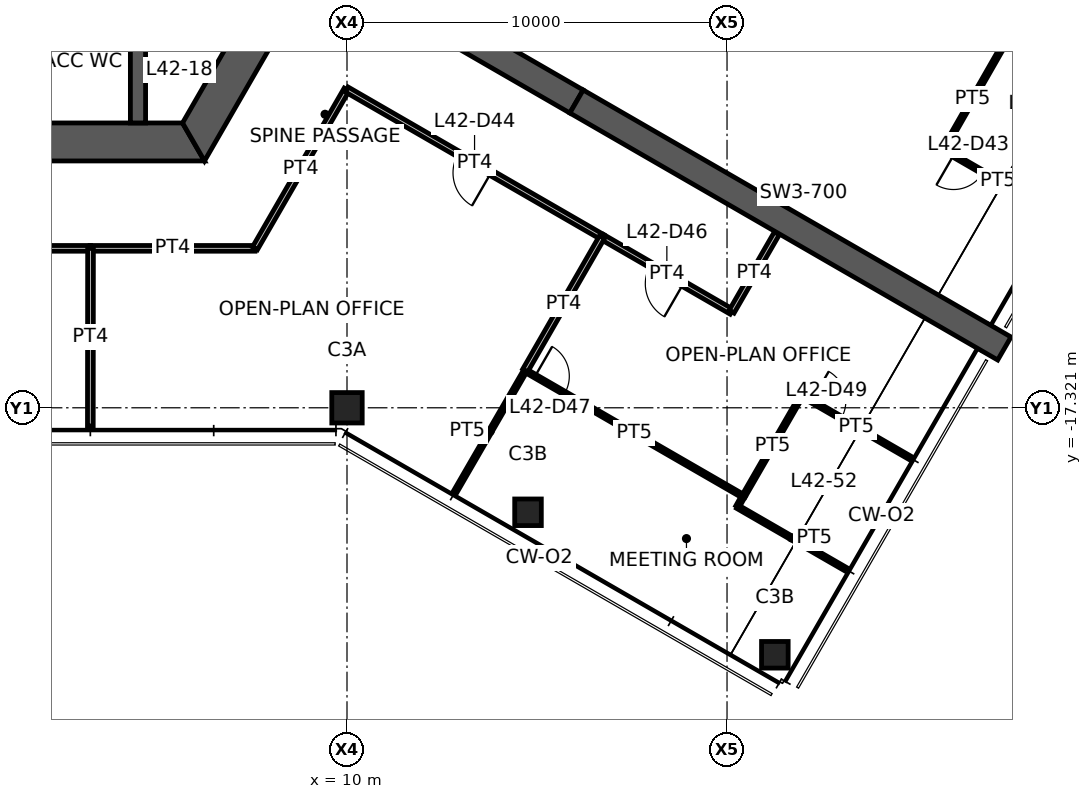
"""IFC4 building model, lengths in metres.
Left out: names, types, materials, properties, quantities, classifications, styles, units other than length and angle.
Written with IfcOpenShell. Run it as: python <this file> out.ifc"""

import sys

from ifc_helpers import new_model, si_unit, direction, frame, frame_2d, origin, origin_2d, place, context, subcontext, project, spatial, polyline, rectangle, hollow_rectangle, outline, extrude, element, fill, save


model = new_model("IFC4")
c1 = context("Model", 3, precision=1e-05, world=origin(), true_north=direction((0.0, 1.0)))
c2 = subcontext(c1, "Body", "Model", "MODEL_VIEW")
j1 = project(units=[si_unit("LENGTHUNIT", "METRE"), si_unit("PLANEANGLEUNIT", "RADIAN")], contexts=[c1])
p1 = place(None, origin())
s1 = spatial("IfcSite", under=j1, at=p1, CompositionType="ELEMENT")
p2 = place(p1, origin())
s2 = spatial("IfcBuilding", under=s1, at=p2, CompositionType="ELEMENT")
p3 = place(p2, frame((0.0, 0.0, 168.2)))
s3 = spatial("IfcBuildingStorey", under=s2, at=p3, CompositionType="ELEMENT", Elevation=168.2)
p4 = place(p3, frame((10.0, -17.321, 0.0), z_axis=(0.0, 0.0, 1.0), x_axis=(1.0, 0.0, 0.0)))
e1 = element("IfcColumn", 1, at=p4, inside=s3, PredefinedType="COLUMN", context=c2, shape_type="SweptSolid", body=[
    extrude(hollow_rectangle(XDim=0.8, YDim=0.8, WallThickness=0.045, at=origin_2d()), origin(), (0.0, 0.0, 1.0), 3.9),
])
for number, where, z_axis, x_axis in (
    (2, (14.763, -20.071, 0.0), (0.0, 0.0, 1.0), (1.0, 0.0, 0.0)),
    (3, (21.258, -23.821, 0.0), (0.0, 0.0, 1.0), (1.0, 0.0, 0.0)),
):
    element("IfcColumn", number, at=place(p3, frame(where, z_axis=z_axis, x_axis=x_axis)), inside=s3, PredefinedType="COLUMN", context=c2, shape_type="SweptSolid", body=[
        extrude(hollow_rectangle(XDim=0.7, YDim=0.7, WallThickness=0.036, at=origin_2d()), origin(), (0.0, 0.0, 1.0), 3.9),
    ])
p5 = place(p3, frame((-5.961, -10.325, 0.0), z_axis=(0.0, 0.0, 1.0), x_axis=(1.0, 0.0, 0.0)))
e4 = element("IfcWall", 4, at=p5, inside=s3, PredefinedType="SHEAR", context=c2, shape_type="SweptSolid", body=[
    extrude(outline(polyline([(-0.289, -0.5), (5.461, -0.5), (6.461, -0.5), (12.211, -0.5), (11.634, 0.5), (6.461, 0.5), (5.461, 0.5), (0.289, 0.5), (-0.289, -0.5)])), origin(), (0.0, 0.0, 1.0), 3.9),
])
p6 = place(p5, frame((5.461, 0.0, 0.0)))
e5 = element("IfcOpeningElement", 5, at=p6, cuts=e4, PredefinedType="OPENING", context=c2, shape_type="SweptSolid", body=[
    extrude(rectangle(XDim=1.0, YDim=2.1, at=frame_2d((0.5, 1.05))), frame((0.0, 0.51, 0.0), z_axis=(0.0, -1.0, 0.0), x_axis=(1.0, 0.0, 0.0)), (0.0, 0.0, 1.0), 1.02),
])
p7 = place(p3, frame((5.961, -10.325, 0.0), z_axis=(0.0, 0.0, 1.0), x_axis=(0.500004296715, 0.866022923061, 0.0)))
e6 = element("IfcWall", 6, at=p7, inside=s3, PredefinedType="SHEAR", context=c2, shape_type="SweptSolid", body=[
    extrude(outline(polyline([(-0.289, -0.5), (4.594, -0.5), (5.394, -0.5), (12.211, -0.5), (11.634, 0.5), (5.394, 0.5), (4.594, 0.5), (0.289, 0.5), (-0.289, -0.5)])), origin(), (0.0, 0.0, 1.0), 3.9),
])
p8 = place(p7, frame((4.594, 0.0, 0.0)))
e7 = element("IfcOpeningElement", 7, at=p8, cuts=e6, PredefinedType="OPENING", context=c2, shape_type="SweptSolid", body=[
    extrude(rectangle(XDim=0.8, YDim=2.1, at=frame_2d((0.4, 1.05))), frame((0.0, 0.51, 0.0), z_axis=(0.0, -1.0, 0.0), x_axis=(1.0, 0.0, 0.0)), (0.0, 0.0, 1.0), 1.02),
])
p9 = place(p3, frame((9.375, -5.413, 0.0), z_axis=(0.0, 0.0, 1.0), x_axis=(0.866032377459, -0.499987921047, 0.0)))
e8 = element("IfcWall", 8, at=p9, inside=s3, PredefinedType="SHEAR", context=c2, shape_type="SweptSolid", body=[
    extrude(rectangle(XDim=7.696, YDim=0.7, at=frame_2d((3.848, 0.0))), origin(), (0.0, 0.0, 1.0), 3.9),
])
p10 = place(p9, frame((0.9, 0.0, 0.0)))
e9 = element("IfcOpeningElement", 9, at=p10, cuts=e8, PredefinedType="OPENING", context=c2, shape_type="SweptSolid", body=[
    extrude(rectangle(XDim=1.0, YDim=2.1, at=frame_2d((0.5, 1.05))), frame((0.0, 0.36, 0.0), z_axis=(0.0, -1.0, 0.0), x_axis=(1.0, 0.0, 0.0)), (0.0, 0.0, 1.0), 0.72),
])
p11 = place(p3, frame((16.039, -9.26, 0.0), z_axis=(0.0, 0.0, 1.0), x_axis=(0.866024837091, -0.50000098154, 0.0)))
e10 = element("IfcWall", 10, at=p11, inside=s3, PredefinedType="SHEAR", context=c2, shape_type="SweptSolid", body=[
    extrude(rectangle(XDim=13.0, YDim=0.7, at=frame_2d((6.5, 0.0))), origin(), (0.0, 0.0, 1.0), 3.9),
])
p12 = place(p3, frame((4.5, -3.8, 0.0), z_axis=(0.0, 0.0, 1.0), x_axis=(0.0, -1.0, 0.0)))
e11 = element("IfcWall", 11, at=p12, inside=s3, PredefinedType="SHEAR", context=c2, shape_type="SweptSolid", body=[
    extrude(rectangle(XDim=6.025, YDim=0.4, at=frame_2d((3.012, 0.0))), origin(), (0.0, 0.0, 1.0), 3.9),
])
p13 = place(p3, frame((25.7, -10.527, 0.0), z_axis=(0.0, 0.0, 1.0), x_axis=(0.497097650811, 0.867694603855, 0.0)))
e12 = element("IfcWall", 12, at=p13, inside=s3, PredefinedType="PARTITIONING", context=c2, shape_type="SweptSolid", body=[
    extrude(rectangle(XDim=3.071, YDim=0.1, at=frame_2d((1.535, 0.0))), origin(), (0.0, 0.0, 1.0), 2.95),
])
p14 = place(p3, frame((28.562, -12.18, 0.0), z_axis=(0.0, 0.0, 1.0), x_axis=(-0.866020751647, 0.500008057651, 0.0)))
e13 = element("IfcWall", 13, at=p14, inside=s3, PredefinedType="PARTITIONING", context=c2, shape_type="SweptSolid", body=[
    extrude(rectangle(XDim=3.305, YDim=0.1, at=frame_2d((1.653, 0.0))), origin(), (0.0, 0.0, 1.0), 2.95),
])
p15 = place(p14, frame((2.105, 0.0, 0.0)))
e14 = element("IfcOpeningElement", 14, at=p15, cuts=e13, PredefinedType="OPENING", context=c2, shape_type="SweptSolid", body=[
    extrude(rectangle(XDim=0.9, YDim=2.1, at=frame_2d((0.45, 1.05))), frame((0.0, 0.06, 0.0), z_axis=(0.0, -1.0, 0.0), x_axis=(1.0, 0.0, 0.0)), (0.0, 0.0, 1.0), 0.12),
])
p16 = place(p3, frame((7.578, -13.125, 0.0), z_axis=(0.0, 0.0, 1.0), x_axis=(-1.0, 0.0, 0.0)))
e15 = element("IfcWall", 15, at=p16, inside=s3, PredefinedType="PARTITIONING", context=c2, shape_type="SweptSolid", body=[
    extrude(rectangle(XDim=4.336, YDim=0.15, at=frame_2d((2.168, 0.0))), origin(), (0.0, 0.0, 1.0), 2.95),
])
p17 = place(p3, frame((9.992, -8.944, 0.0), z_axis=(0.0, 0.0, 1.0), x_axis=(-0.500033248206, -0.866006207073, 0.0)))
e16 = element("IfcWall", 16, at=p17, inside=s3, PredefinedType="PARTITIONING", context=c2, shape_type="SweptSolid", body=[
    extrude(rectangle(XDim=4.828, YDim=0.15, at=frame_2d((2.414, 0.0))), origin(), (0.0, 0.0, 1.0), 2.95),
])
p18 = place(p3, frame((16.721, -12.83, 0.0), z_axis=(0.0, 0.0, 1.0), x_axis=(-0.866020780657, 0.500008007406, 0.0)))
e17 = element("IfcWall", 17, at=p18, inside=s3, PredefinedType="PARTITIONING", context=c2, shape_type="SweptSolid", body=[
    extrude(rectangle(XDim=7.771, YDim=0.15, at=frame_2d((3.885, 0.0))), origin(), (0.0, 0.0, 1.0), 2.95),
])
p19 = place(p18, frame((3.385, 0.0, 0.0)))
e18 = element("IfcOpeningElement", 18, at=p19, cuts=e17, PredefinedType="OPENING", context=c2, shape_type="SweptSolid", body=[
    extrude(rectangle(XDim=1.0, YDim=2.1, at=frame_2d((0.5, 1.05))), frame((0.0, 0.085, 0.0), z_axis=(0.0, -1.0, 0.0), x_axis=(1.0, 0.0, 0.0)), (0.0, 0.0, 1.0), 0.17),
])
p20 = place(p3, frame((3.251, -13.125, 0.0), z_axis=(0.0, 0.0, 1.0), x_axis=(-1.0, 0.0, 0.0)))
e19 = element("IfcWall", 19, at=p20, inside=s3, PredefinedType="PARTITIONING", context=c2, shape_type="SweptSolid", body=[
    extrude(rectangle(XDim=5.096, YDim=0.15, at=frame_2d((2.548, 0.0))), origin(), (0.0, 0.0, 1.0), 2.95),
])
p21 = place(p20, frame((2.048, 0.0, 0.0)))
e20 = element("IfcOpeningElement", 20, at=p21, cuts=e19, PredefinedType="OPENING", context=c2, shape_type="SweptSolid", body=[
    extrude(rectangle(XDim=1.0, YDim=2.1, at=frame_2d((0.5, 1.05))), frame((0.0, 0.085, 0.0), z_axis=(0.0, -1.0, 0.0), x_axis=(1.0, 0.0, 0.0)), (0.0, 0.0, 1.0), 0.17),
])
p22 = place(p3, frame((20.12, -14.792, 0.0), z_axis=(0.0, 0.0, 1.0), x_axis=(-0.866038848349, 0.499976712608, 0.0)))
e21 = element("IfcWall", 21, at=p22, inside=s3, PredefinedType="PARTITIONING", context=c2, shape_type="SweptSolid", body=[
    extrude(rectangle(XDim=3.934, YDim=0.15, at=frame_2d((1.967, 0.0))), origin(), (0.0, 0.0, 1.0), 2.95),
])
p23 = place(p22, frame((1.467, 0.0, 0.0)))
e22 = element("IfcOpeningElement", 22, at=p23, cuts=e21, PredefinedType="OPENING", context=c2, shape_type="SweptSolid", body=[
    extrude(rectangle(XDim=1.0, YDim=2.1, at=frame_2d((0.5, 1.05))), frame((0.0, 0.085, 0.0), z_axis=(0.0, -1.0, 0.0), x_axis=(1.0, 0.0, 0.0)), (0.0, 0.0, 1.0), 0.17),
])
p24 = place(p3, frame((21.31, -12.731, 0.0), z_axis=(0.0, 0.0, 1.0), x_axis=(-0.500077627542, -0.865980580863, 0.0)))
e23 = element("IfcWall", 23, at=p24, inside=s3, PredefinedType="PARTITIONING", context=c2, shape_type="SweptSolid", body=[
    extrude(rectangle(XDim=2.38, YDim=0.15, at=frame_2d((1.19, 0.0))), origin(), (0.0, 0.0, 1.0), 2.95),
])
p25 = place(p3, frame((20.275, -19.924, 0.0), z_axis=(0.0, 0.0, 1.0), x_axis=(0.86598972202, -0.500061797536, 0.0)))
e24 = element("IfcWall", 24, at=p25, inside=s3, PredefinedType="PARTITIONING", context=c2, shape_type="SweptSolid", body=[
    extrude(rectangle(XDim=3.28, YDim=0.1, at=frame_2d((1.64, 0.0))), origin(), (0.0, 0.0, 1.0), 2.95),
])
p26 = place(p3, frame((20.43, -19.646, 0.0), z_axis=(0.0, 0.0, 1.0), x_axis=(-0.486425680342, -0.873721956634, 0.0)))
e25 = element("IfcWall", 25, at=p26, inside=s3, PredefinedType="PARTITIONING", context=c2, shape_type="SweptSolid", body=[
    extrude(rectangle(XDim=0.318, YDim=0.1, at=frame_2d((0.159, 0.0))), origin(), (0.0, 0.0, 1.0), 2.95),
])
p27 = place(p3, frame((12.84, -19.543, 0.0), z_axis=(0.0, 0.0, 1.0), x_axis=(0.50111938689, 0.865378160161, 0.0)))
e26 = element("IfcWall", 26, at=p27, inside=s3, PredefinedType="PARTITIONING", context=c2, shape_type="SweptSolid", body=[
    extrude(rectangle(XDim=3.705, YDim=0.1, at=frame_2d((1.853, 0.0))), origin(), (0.0, 0.0, 1.0), 2.95),
])
p28 = place(p3, frame((14.69, -16.338, 0.0), z_axis=(0.0, 0.0, 1.0), x_axis=(0.866056800938, -0.499945614591, 0.0)))
e27 = element("IfcWall", 27, at=p28, inside=s3, PredefinedType="PARTITIONING", context=c2, shape_type="SweptSolid", body=[
    extrude(rectangle(XDim=6.629, YDim=0.1, at=frame_2d((3.314, 0.0))), origin(), (0.0, 0.0, 1.0), 2.95),
])
p29 = place(p28, frame((0.3, 0.0, 0.0)))
e28 = element("IfcOpeningElement", 28, at=p29, cuts=e27, PredefinedType="OPENING", context=c2, shape_type="SweptSolid", body=[
    extrude(rectangle(XDim=0.9, YDim=2.1, at=frame_2d((0.45, 1.05))), frame((0.0, 0.06, 0.0), z_axis=(0.0, -1.0, 0.0), x_axis=(1.0, 0.0, 0.0)), (0.0, 0.0, 1.0), 0.12),
])
p30 = place(p3, frame((20.431, -19.653, 0.0), z_axis=(0.0, 0.0, 1.0), x_axis=(0.500029867204, 0.86600815926, 0.0)))
e29 = element("IfcWall", 29, at=p30, inside=s3, PredefinedType="PARTITIONING", context=c2, shape_type="SweptSolid", body=[
    extrude(rectangle(XDim=3.071, YDim=0.1, at=frame_2d((1.535, 0.0))), origin(), (0.0, 0.0, 1.0), 2.95),
])
p31 = place(p3, frame((21.967, -16.993, 0.0), z_axis=(0.0, 0.0, 1.0), x_axis=(0.866020751647, -0.500008057651, 0.0)))
e30 = element("IfcWall", 30, at=p31, inside=s3, PredefinedType="PARTITIONING", context=c2, shape_type="SweptSolid", body=[
    extrude(rectangle(XDim=3.305, YDim=0.1, at=frame_2d((1.653, 0.0))), origin(), (0.0, 0.0, 1.0), 2.95),
])
p32 = place(p31, frame((0.3, 0.0, 0.0)))
e31 = element("IfcOpeningElement", 31, at=p32, cuts=e30, PredefinedType="OPENING", context=c2, shape_type="SweptSolid", body=[
    extrude(rectangle(XDim=0.9, YDim=2.1, at=frame_2d((0.45, 1.05))), frame((0.0, 0.06, 0.0), z_axis=(0.0, -1.0, 0.0), x_axis=(1.0, 0.0, 0.0)), (0.0, 0.0, 1.0), 0.12),
])
p33 = place(p3, frame((3.246, -17.801, 0.0), z_axis=(0.0, 0.0, 1.0), x_axis=(0.001096662352, 0.999999398666, 0.0)))
e32 = element("IfcWall", 32, at=p33, inside=s3, PredefinedType="PARTITIONING", context=c2, shape_type="SweptSolid", body=[
    extrude(rectangle(XDim=4.675, YDim=0.15, at=frame_2d((2.337, 0.0))), origin(), (0.0, 0.0, 1.0), 2.95),
])
p34 = place(p3, frame((16.713, -12.825, 0.0), z_axis=(0.0, 0.0, 1.0), x_axis=(-0.498976779382, -0.866615355067, 0.0)))
e33 = element("IfcWall", 33, at=p34, inside=s3, PredefinedType="PARTITIONING", context=c2, shape_type="SweptSolid", body=[
    extrude(rectangle(XDim=4.054, YDim=0.15, at=frame_2d((2.027, 0.0))), origin(), (0.0, 0.0, 1.0), 2.95),
])
p35 = place(p15, origin())
e34 = element("IfcDoor", 34, at=p35, inside=s3, OperationType="SINGLE_SWING_RIGHT", PredefinedType="DOOR", context=c2, shape_type="SweptSolid", body=[
    extrude(rectangle(XDim=0.9, YDim=2.1, at=frame_2d((0.45, 1.05))), frame((0.0, 0.025, 0.0), z_axis=(0.0, -1.0, 0.0), x_axis=(1.0, 0.0, 0.0)), (0.0, 0.0, 1.0), 0.05),
])
fill(e14, e34)
p36 = place(p19, origin())
e35 = element("IfcDoor", 35, at=p36, inside=s3, OperationType="SINGLE_SWING_LEFT", PredefinedType="DOOR", context=c2, shape_type="SweptSolid", body=[
    extrude(rectangle(XDim=1.0, YDim=2.1, at=frame_2d((0.5, 1.05))), frame((0.0, 0.025, 0.0), z_axis=(0.0, -1.0, 0.0), x_axis=(1.0, 0.0, 0.0)), (0.0, 0.0, 1.0), 0.05),
])
fill(e18, e35)
p37 = place(p23, origin())
e36 = element("IfcDoor", 36, at=p37, inside=s3, OperationType="SINGLE_SWING_LEFT", PredefinedType="DOOR", context=c2, shape_type="SweptSolid", body=[
    extrude(rectangle(XDim=1.0, YDim=2.1, at=frame_2d((0.5, 1.05))), frame((0.0, 0.025, 0.0), z_axis=(0.0, -1.0, 0.0), x_axis=(1.0, 0.0, 0.0)), (0.0, 0.0, 1.0), 0.05),
])
fill(e22, e36)
p38 = place(p29, origin())
e37 = element("IfcDoor", 37, at=p38, inside=s3, OperationType="SINGLE_SWING_LEFT", PredefinedType="DOOR", context=c2, shape_type="SweptSolid", body=[
    extrude(rectangle(XDim=0.9, YDim=2.1, at=frame_2d((0.45, 1.05))), frame((0.0, 0.025, 0.0), z_axis=(0.0, -1.0, 0.0), x_axis=(1.0, 0.0, 0.0)), (0.0, 0.0, 1.0), 0.05),
])
fill(e28, e37)
p39 = place(p32, origin())
e38 = element("IfcDoor", 38, at=p39, inside=s3, OperationType="SINGLE_SWING_LEFT", PredefinedType="DOOR", context=c2, shape_type="SweptSolid", body=[
    extrude(rectangle(XDim=0.9, YDim=2.1, at=frame_2d((0.45, 1.05))), frame((0.0, 0.025, 0.0), z_axis=(0.0, -1.0, 0.0), x_axis=(1.0, 0.0, 0.0)), (0.0, 0.0, 1.0), 0.05),
])
fill(e31, e38)
save(model, sys.argv[1])
